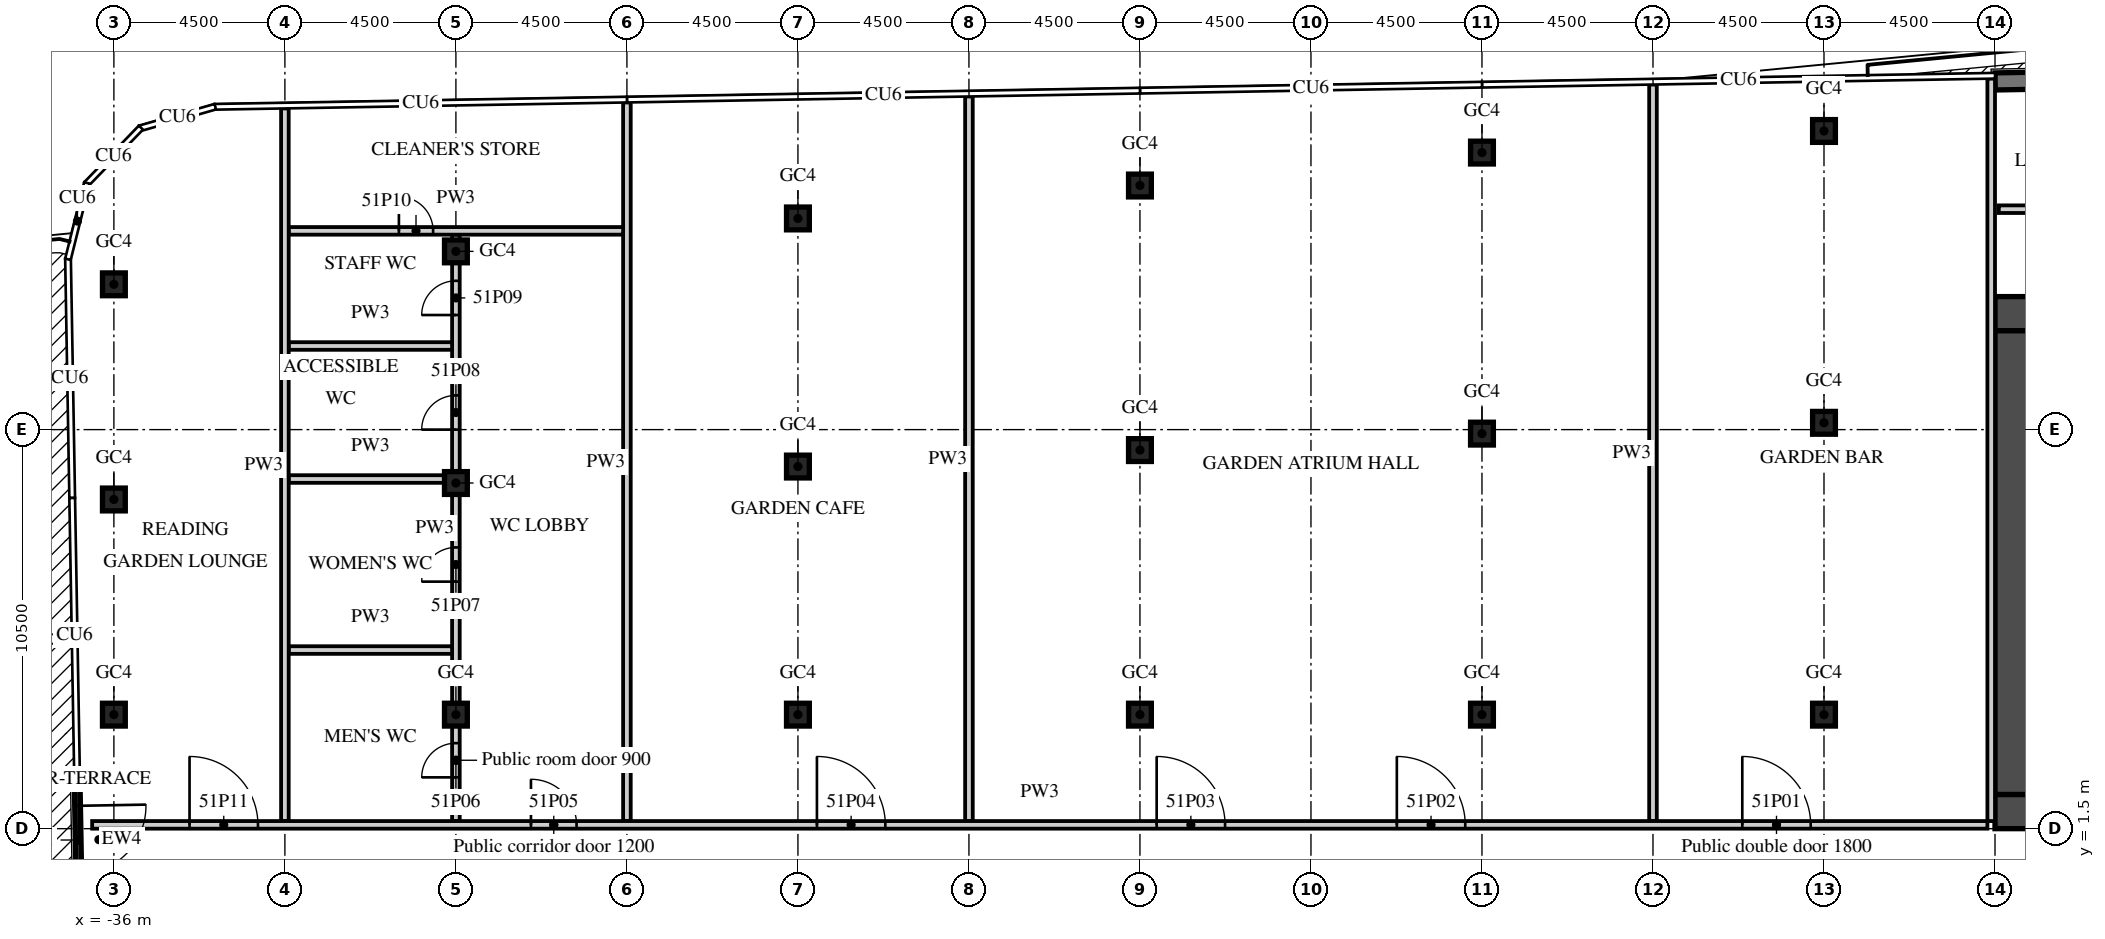
"""IFC4 building model, lengths in metres.
Left out: names, types, materials, properties, quantities, classifications, styles, units other than length and angle.
Written with IfcOpenShell. Run it as: python <this file> out.ifc"""

import sys

from ifc_helpers import new_model, si_unit, direction, frame, frame_2d, origin, origin_2d, place, context, subcontext, project, spatial, rectangle, extrude, element, fill, save


model = new_model("IFC4")
c1 = context("Model", 3, precision=1e-05, world=origin(), true_north=direction((0.0, 1.0)))
c2 = subcontext(c1, "Body", "Model", "MODEL_VIEW")
j1 = project(units=[si_unit("LENGTHUNIT", "METRE"), si_unit("PLANEANGLEUNIT", "RADIAN")], contexts=[c1])
p1 = place(None, origin())
s1 = spatial("IfcSite", under=j1, at=p1, CompositionType="ELEMENT")
p2 = place(p1, origin())
s2 = spatial("IfcBuilding", under=s1, at=p2, CompositionType="ELEMENT")
p3 = place(p2, frame((0.0, 0.0, 211.1)))
s3 = spatial("IfcBuildingStorey", under=s2, at=p3, CompositionType="ELEMENT", Elevation=211.1)
for number, where, z_axis, x_axis in (
    (1, (-36.0, 4.5, 0.0), (0.0, 0.0, 1.0), (1.0, 0.0, 0.0)),
    (2, (-36.0, 10.162, 0.0), (0.0, 0.0, 1.0), (1.0, 0.0, 0.0)),
    (3, (-36.0, 15.823, 0.0), (0.0, 0.0, 1.0), (1.0, 0.0, 0.0)),
    (4, (-27.0, 4.5, 0.0), (0.0, 0.0, 1.0), (1.0, 0.0, 0.0)),
    (5, (-27.0, 10.595, 0.0), (0.0, 0.0, 1.0), (1.0, 0.0, 0.0)),
    (6, (-27.0, 16.69, 0.0), (0.0, 0.0, 1.0), (1.0, 0.0, 0.0)),
    (7, (-18.0, 4.5, 0.0), (0.0, 0.0, 1.0), (1.0, 0.0, 0.0)),
    (8, (-18.0, 11.028, 0.0), (0.0, 0.0, 1.0), (1.0, 0.0, 0.0)),
    (9, (-18.0, 17.556, 0.0), (0.0, 0.0, 1.0), (1.0, 0.0, 0.0)),
    (10, (-9.0, 4.5, 0.0), (0.0, 0.0, 1.0), (1.0, 0.0, 0.0)),
    (11, (-9.0, 11.461, 0.0), (0.0, 0.0, 1.0), (1.0, 0.0, 0.0)),
    (12, (-9.0, 18.423, 0.0), (0.0, 0.0, 1.0), (1.0, 0.0, 0.0)),
    (13, (0.0, 4.5, 0.0), (0.0, 0.0, 1.0), (1.0, 0.0, 0.0)),
    (14, (0.0, 11.895, 0.0), (0.0, 0.0, 1.0), (1.0, 0.0, 0.0)),
    (15, (0.0, 19.29, 0.0), (0.0, 0.0, 1.0), (1.0, 0.0, 0.0)),
    (16, (9.0, 4.5, 0.0), (0.0, 0.0, 1.0), (1.0, 0.0, 0.0)),
    (17, (9.0, 12.179, 0.0), (0.0, 0.0, 1.0), (1.0, 0.0, 0.0)),
    (18, (9.0, 19.858, 0.0), (0.0, 0.0, 1.0), (1.0, 0.0, 0.0)),
):
    element("IfcColumn", number, at=place(p3, frame(where, z_axis=z_axis, x_axis=x_axis)), inside=s3, PredefinedType="COLUMN", context=c2, shape_type="SweptSolid", body=[
        extrude(rectangle(XDim=0.6, YDim=0.6, at=origin_2d()), origin(), (0.0, 0.0, 1.0), 5.32),
    ])
p4 = place(p3, frame((-36.971, 3.001, 0.0), z_axis=(0.0, 0.0, 1.0), x_axis=(0.017429353659, -0.999848097278, 0.0)))
e19 = element("IfcWall", 19, at=p4, inside=s3, PredefinedType="SOLIDWALL", context=c2, shape_type="SweptSolid", body=[
    extrude(rectangle(XDim=3.6, YDim=0.15, at=frame_2d((1.8, 0.0))), origin(), (0.0, 0.0, 1.0), 6.32),
])
p5 = place(p4, frame((0.9, 0.0, 0.0)))
e20 = element("IfcOpeningElement", 20, at=p5, cuts=e19, PredefinedType="OPENING", context=c2, shape_type="SweptSolid", body=[
    extrude(rectangle(XDim=1.8, YDim=2.4, at=frame_2d((0.9, 1.2))), frame((0.0, 0.085, 0.0), z_axis=(0.0, -1.0, 0.0), x_axis=(1.0, 0.0, 0.0)), (0.0, 0.0, 1.0), 0.17),
])
p6 = place(p3, frame((31.504, 21.476, 0.0), z_axis=(0.0, 0.0, 1.0), x_axis=(-0.999847677887, -0.017453395744, 0.0)))
e21 = element("IfcWall", 21, at=p6, inside=s3, PredefinedType="SOLIDWALL", context=c2, shape_type="SweptSolid", body=[
    extrude(rectangle(XDim=18.003, YDim=0.45, at=frame_2d((9.001, 0.0))), origin(), (0.0, 0.0, 1.0), 6.32),
])
p7 = place(p3, frame((13.5, 1.95, 0.0), z_axis=(0.0, 0.0, 1.0), x_axis=(1.0, 0.0, 0.0)))
e22 = element("IfcWall", 22, at=p7, inside=s3, PredefinedType="SHEAR", context=c2, shape_type="SweptSolid", body=[
    extrude(rectangle(XDim=18.0, YDim=0.9, at=frame_2d((9.0, 0.0))), origin(), (0.0, 0.0, 1.0), 6.32),
])
p8 = place(p7, frame((1.475, 0.0, 0.0)))
e23 = element("IfcOpeningElement", 23, at=p8, cuts=e22, PredefinedType="OPENING", context=c2, shape_type="SweptSolid", body=[
    extrude(rectangle(XDim=1.8, YDim=2.1, at=frame_2d((0.9, 1.05))), frame((0.0, 0.46, 0.0), z_axis=(0.0, -1.0, 0.0), x_axis=(1.0, 0.0, 0.0)), (0.0, 0.0, 1.0), 0.92),
])
p9 = place(p3, frame((13.5, 15.05, 0.0), z_axis=(0.0, 0.0, 1.0), x_axis=(1.0, 0.0, 0.0)))
e24 = element("IfcWall", 24, at=p9, inside=s3, PredefinedType="SHEAR", context=c2, shape_type="SweptSolid", body=[
    extrude(rectangle(XDim=6.8, YDim=0.9, at=frame_2d((3.4, 0.0))), origin(), (0.0, 0.0, 1.0), 6.32),
])
p10 = place(p9, frame((4.725, 0.0, 0.0)))
e25 = element("IfcOpeningElement", 25, at=p10, cuts=e24, PredefinedType="OPENING", context=c2, shape_type="SweptSolid", body=[
    extrude(rectangle(XDim=1.2, YDim=2.1, at=frame_2d((0.6, 1.05))), frame((0.0, 0.46, 0.0), z_axis=(0.0, -1.0, 0.0), x_axis=(1.0, 0.0, 0.0)), (0.0, 0.0, 1.0), 0.92),
])
p11 = place(p3, frame((13.95, 2.4, 0.0), z_axis=(0.0, 0.0, 1.0), x_axis=(0.0, 1.0, 0.0)))
e26 = element("IfcWall", 26, at=p11, inside=s3, PredefinedType="SHEAR", context=c2, shape_type="SweptSolid", body=[
    extrude(rectangle(XDim=12.2, YDim=0.9, at=frame_2d((6.1, 0.0))), origin(), (0.0, 0.0, 1.0), 6.32),
])
p12 = place(p3, frame((13.6, 17.8, 0.0), z_axis=(0.0, 0.0, 1.0), x_axis=(1.0, 0.0, 0.0)))
e27 = element("IfcWall", 27, at=p12, inside=s3, PredefinedType="PARTITIONING", context=c2, shape_type="SweptSolid", body=[
    extrude(rectangle(XDim=28.958, YDim=0.2, at=frame_2d((14.479, 0.0))), origin(), (0.0, 0.0, 1.0), 6.32),
])
p13 = place(p12, frame((16.613, 0.0, 0.0)))
e28 = element("IfcOpeningElement", 28, at=p13, cuts=e27, PredefinedType="OPENING", context=c2, shape_type="SweptSolid", body=[
    extrude(rectangle(XDim=0.9, YDim=2.1, at=frame_2d((0.45, 1.05))), frame((0.0, 0.11, 0.0), z_axis=(0.0, -1.0, 0.0), x_axis=(1.0, 0.0, 0.0)), (0.0, 0.0, 1.0), 0.22),
])
p14 = place(p12, frame((8.312, 0.0, 0.0)))
e29 = element("IfcOpeningElement", 29, at=p14, cuts=e27, PredefinedType="OPENING", context=c2, shape_type="SweptSolid", body=[
    extrude(rectangle(XDim=0.9, YDim=2.1, at=frame_2d((0.45, 1.05))), frame((0.0, 0.11, 0.0), z_axis=(0.0, -1.0, 0.0), x_axis=(1.0, 0.0, 0.0)), (0.0, 0.0, 1.0), 0.22),
])
p15 = place(p3, frame((4.5, 1.7, 0.0), z_axis=(0.0, 0.0, 1.0), x_axis=(0.0, 1.0, 0.0)))
e30 = element("IfcWall", 30, at=p15, inside=s3, PredefinedType="PARTITIONING", context=c2, shape_type="SweptSolid", body=[
    extrude(rectangle(XDim=19.379, YDim=0.2, at=frame_2d((9.69, 0.0))), origin(), (0.0, 0.0, 1.0), 6.32),
])
p16 = place(p3, frame((-13.5, 1.7, 0.0), z_axis=(0.0, 0.0, 1.0), x_axis=(0.0, 1.0, 0.0)))
e31 = element("IfcWall", 31, at=p16, inside=s3, PredefinedType="PARTITIONING", context=c2, shape_type="SweptSolid", body=[
    extrude(rectangle(XDim=19.065, YDim=0.2, at=frame_2d((9.533, 0.0))), origin(), (0.0, 0.0, 1.0), 6.32),
])
p17 = place(p3, frame((-22.5, 1.7, 0.0), z_axis=(0.0, 0.0, 1.0), x_axis=(0.0, 1.0, 0.0)))
e32 = element("IfcWall", 32, at=p17, inside=s3, PredefinedType="PARTITIONING", context=c2, shape_type="SweptSolid", body=[
    extrude(rectangle(XDim=18.908, YDim=0.2, at=frame_2d((9.454, 0.0))), origin(), (0.0, 0.0, 1.0), 6.32),
])
p18 = place(p3, frame((-27.0, 1.7, 0.0), z_axis=(0.0, 0.0, 1.0), x_axis=(0.0, 1.0, 0.0)))
e33 = element("IfcWall", 33, at=p18, inside=s3, PredefinedType="PARTITIONING", context=c2, shape_type="SweptSolid", body=[
    extrude(rectangle(XDim=15.429, YDim=0.2, at=frame_2d((7.715, 0.0))), origin(), (0.0, 0.0, 1.0), 5.32),
])
p19 = place(p18, frame((1.15, 0.0, 0.0)))
e34 = element("IfcOpeningElement", 34, at=p19, cuts=e33, PredefinedType="OPENING", context=c2, shape_type="SweptSolid", body=[
    extrude(rectangle(XDim=0.9, YDim=2.1, at=frame_2d((0.45, 1.05))), frame((0.0, 0.11, 0.0), z_axis=(0.0, -1.0, 0.0), x_axis=(1.0, 0.0, 0.0)), (0.0, 0.0, 1.0), 0.22),
])
p20 = place(p18, frame((6.3, 0.0, 0.0)))
e35 = element("IfcOpeningElement", 35, at=p20, cuts=e33, PredefinedType="OPENING", context=c2, shape_type="SweptSolid", body=[
    extrude(rectangle(XDim=0.9, YDim=2.1, at=frame_2d((0.45, 1.05))), frame((0.0, 0.11, 0.0), z_axis=(0.0, -1.0, 0.0), x_axis=(1.0, 0.0, 0.0)), (0.0, 0.0, 1.0), 0.22),
])
p21 = place(p18, frame((10.3, 0.0, 0.0)))
e36 = element("IfcOpeningElement", 36, at=p21, cuts=e33, PredefinedType="OPENING", context=c2, shape_type="SweptSolid", body=[
    extrude(rectangle(XDim=0.9, YDim=2.1, at=frame_2d((0.45, 1.05))), frame((0.0, 0.11, 0.0), z_axis=(0.0, -1.0, 0.0), x_axis=(1.0, 0.0, 0.0)), (0.0, 0.0, 1.0), 0.22),
])
p22 = place(p18, frame((13.315, 0.0, 0.0)))
e37 = element("IfcOpeningElement", 37, at=p22, cuts=e33, PredefinedType="OPENING", context=c2, shape_type="SweptSolid", body=[
    extrude(rectangle(XDim=0.9, YDim=2.1, at=frame_2d((0.45, 1.05))), frame((0.0, 0.11, 0.0), z_axis=(0.0, -1.0, 0.0), x_axis=(1.0, 0.0, 0.0)), (0.0, 0.0, 1.0), 0.22),
])
for number, where, z_axis, x_axis in (
    (38, (-31.4, 6.2, 0.0), (0.0, 0.0, 1.0), (1.0, 0.0, 0.0)),
    (39, (-31.4, 10.7, 0.0), (0.0, 0.0, 1.0), (1.0, 0.0, 0.0)),
    (40, (-31.4, 14.2, 0.0), (0.0, 0.0, 1.0), (1.0, 0.0, 0.0)),
):
    element("IfcWall", number, at=place(p3, frame(where, z_axis=z_axis, x_axis=x_axis)), inside=s3, PredefinedType="PARTITIONING", context=c2, shape_type="SweptSolid", body=[
        extrude(rectangle(XDim=4.3, YDim=0.2, at=frame_2d((2.15, 0.0))), origin(), (0.0, 0.0, 1.0), 5.32),
    ])
p23 = place(p3, frame((-31.4, 17.229, 0.0), z_axis=(0.0, 0.0, 1.0), x_axis=(1.0, 0.0, 0.0)))
e41 = element("IfcWall", 41, at=p23, inside=s3, PredefinedType="PARTITIONING", context=c2, shape_type="SweptSolid", body=[
    extrude(rectangle(XDim=8.8, YDim=0.2, at=frame_2d((4.4, 0.0))), origin(), (0.0, 0.0, 1.0), 5.32),
])
p24 = place(p23, frame((2.9, 0.0, 0.0)))
e42 = element("IfcOpeningElement", 42, at=p24, cuts=e41, PredefinedType="OPENING", context=c2, shape_type="SweptSolid", body=[
    extrude(rectangle(XDim=0.9, YDim=2.1, at=frame_2d((0.45, 1.05))), frame((0.0, 0.11, 0.0), z_axis=(0.0, -1.0, 0.0), x_axis=(1.0, 0.0, 0.0)), (0.0, 0.0, 1.0), 0.22),
])
p25 = place(p3, frame((-31.5, 1.7, 0.0), z_axis=(0.0, 0.0, 1.0), x_axis=(0.0, 1.0, 0.0)))
e43 = element("IfcWall", 43, at=p25, inside=s3, PredefinedType="PARTITIONING", context=c2, shape_type="SweptSolid", body=[
    extrude(rectangle(XDim=18.751, YDim=0.2, at=frame_2d((9.375, 0.0))), origin(), (0.0, 0.0, 1.0), 6.32),
])
p26 = place(p3, frame((-36.572, 1.6, 0.0), z_axis=(0.0, 0.0, 1.0), x_axis=(1.0, 0.0, 0.0)))
e44 = element("IfcWall", 44, at=p26, inside=s3, PredefinedType="PARTITIONING", context=c2, shape_type="SweptSolid", body=[
    extrude(rectangle(XDim=49.872, YDim=0.2, at=frame_2d((24.936, 0.0))), origin(), (0.0, 0.0, 1.0), 5.32),
])
p27 = place(p26, frame((43.422, 0.0, 0.0)))
e45 = element("IfcOpeningElement", 45, at=p27, cuts=e44, PredefinedType="OPENING", context=c2, shape_type="SweptSolid", body=[
    extrude(rectangle(XDim=1.8, YDim=2.1, at=frame_2d((0.9, 1.05))), frame((0.0, 0.11, 0.0), z_axis=(0.0, -1.0, 0.0), x_axis=(1.0, 0.0, 0.0)), (0.0, 0.0, 1.0), 0.22),
])
p28 = place(p26, frame((34.332, 0.0, 0.0)))
e46 = element("IfcOpeningElement", 46, at=p28, cuts=e44, PredefinedType="OPENING", context=c2, shape_type="SweptSolid", body=[
    extrude(rectangle(XDim=1.8, YDim=2.1, at=frame_2d((0.9, 1.05))), frame((0.0, 0.11, 0.0), z_axis=(0.0, -1.0, 0.0), x_axis=(1.0, 0.0, 0.0)), (0.0, 0.0, 1.0), 0.22),
])
p29 = place(p26, frame((28.012, 0.0, 0.0)))
e47 = element("IfcOpeningElement", 47, at=p29, cuts=e44, PredefinedType="OPENING", context=c2, shape_type="SweptSolid", body=[
    extrude(rectangle(XDim=1.8, YDim=2.1, at=frame_2d((0.9, 1.05))), frame((0.0, 0.11, 0.0), z_axis=(0.0, -1.0, 0.0), x_axis=(1.0, 0.0, 0.0)), (0.0, 0.0, 1.0), 0.22),
])
p30 = place(p26, frame((19.072, 0.0, 0.0)))
e48 = element("IfcOpeningElement", 48, at=p30, cuts=e44, PredefinedType="OPENING", context=c2, shape_type="SweptSolid", body=[
    extrude(rectangle(XDim=1.8, YDim=2.1, at=frame_2d((0.9, 1.05))), frame((0.0, 0.11, 0.0), z_axis=(0.0, -1.0, 0.0), x_axis=(1.0, 0.0, 0.0)), (0.0, 0.0, 1.0), 0.22),
])
p31 = place(p26, frame((11.547, 0.0, 0.0)))
e49 = element("IfcOpeningElement", 49, at=p31, cuts=e44, PredefinedType="OPENING", context=c2, shape_type="SweptSolid", body=[
    extrude(rectangle(XDim=1.2, YDim=2.1, at=frame_2d((0.6, 1.05))), frame((0.0, 0.11, 0.0), z_axis=(0.0, -1.0, 0.0), x_axis=(1.0, 0.0, 0.0)), (0.0, 0.0, 1.0), 0.22),
])
p32 = place(p26, frame((2.563, 0.0, 0.0)))
e50 = element("IfcOpeningElement", 50, at=p32, cuts=e44, PredefinedType="OPENING", context=c2, shape_type="SweptSolid", body=[
    extrude(rectangle(XDim=1.8, YDim=2.1, at=frame_2d((0.9, 1.05))), frame((0.0, 0.11, 0.0), z_axis=(0.0, -1.0, 0.0), x_axis=(1.0, 0.0, 0.0)), (0.0, 0.0, 1.0), 0.22),
])
p33 = place(p3, frame((13.4, 1.7, 0.0), z_axis=(0.0, 0.0, 1.0), x_axis=(0.0, 1.0, 0.0)))
e51 = element("IfcWall", 51, at=p33, inside=s3, PredefinedType="PARTITIONING", context=c2, shape_type="SweptSolid", body=[
    extrude(rectangle(XDim=19.535, YDim=0.2, at=frame_2d((9.767, 0.0))), origin(), (0.0, 0.0, 1.0), 6.32),
])
p34 = place(p5, origin())
e52 = element("IfcDoor", 52, at=p34, inside=s3, OperationType="SINGLE_SWING_LEFT", PredefinedType="DOOR", context=c2, shape_type="SweptSolid", body=[
    extrude(rectangle(XDim=1.8, YDim=2.4, at=frame_2d((0.9, 1.2))), frame((0.0, 0.025, 0.0), z_axis=(0.0, -1.0, 0.0), x_axis=(1.0, 0.0, 0.0)), (0.0, 0.0, 1.0), 0.05),
])
fill(e20, e52)
p35 = place(p27, origin())
e53 = element("IfcDoor", 53, at=p35, inside=s3, OperationType="DOUBLE_DOOR_DOUBLE_SWING", PredefinedType="DOOR", context=c2, shape_type="SweptSolid", body=[
    extrude(rectangle(XDim=1.8, YDim=2.1, at=frame_2d((0.9, 1.05))), frame((0.0, 0.025, 0.0), z_axis=(0.0, -1.0, 0.0), x_axis=(1.0, 0.0, 0.0)), (0.0, 0.0, 1.0), 0.05),
])
fill(e45, e53)
p36 = place(p28, origin())
e54 = element("IfcDoor", 54, at=p36, inside=s3, OperationType="DOUBLE_DOOR_DOUBLE_SWING", PredefinedType="DOOR", context=c2, shape_type="SweptSolid", body=[
    extrude(rectangle(XDim=1.8, YDim=2.1, at=frame_2d((0.9, 1.05))), frame((0.0, 0.025, 0.0), z_axis=(0.0, -1.0, 0.0), x_axis=(1.0, 0.0, 0.0)), (0.0, 0.0, 1.0), 0.05),
])
fill(e46, e54)
p37 = place(p29, origin())
e55 = element("IfcDoor", 55, at=p37, inside=s3, OperationType="DOUBLE_DOOR_DOUBLE_SWING", PredefinedType="DOOR", context=c2, shape_type="SweptSolid", body=[
    extrude(rectangle(XDim=1.8, YDim=2.1, at=frame_2d((0.9, 1.05))), frame((0.0, 0.025, 0.0), z_axis=(0.0, -1.0, 0.0), x_axis=(1.0, 0.0, 0.0)), (0.0, 0.0, 1.0), 0.05),
])
fill(e47, e55)
p38 = place(p30, origin())
e56 = element("IfcDoor", 56, at=p38, inside=s3, OperationType="DOUBLE_DOOR_DOUBLE_SWING", PredefinedType="DOOR", context=c2, shape_type="SweptSolid", body=[
    extrude(rectangle(XDim=1.8, YDim=2.1, at=frame_2d((0.9, 1.05))), frame((0.0, 0.025, 0.0), z_axis=(0.0, -1.0, 0.0), x_axis=(1.0, 0.0, 0.0)), (0.0, 0.0, 1.0), 0.05),
])
fill(e48, e56)
p39 = place(p31, origin())
e57 = element("IfcDoor", 57, at=p39, inside=s3, OperationType="SINGLE_SWING_LEFT", PredefinedType="DOOR", context=c2, shape_type="SweptSolid", body=[
    extrude(rectangle(XDim=1.2, YDim=2.1, at=frame_2d((0.6, 1.05))), frame((0.0, 0.025, 0.0), z_axis=(0.0, -1.0, 0.0), x_axis=(1.0, 0.0, 0.0)), (0.0, 0.0, 1.0), 0.05),
])
fill(e49, e57)
p40 = place(p19, origin())
e58 = element("IfcDoor", 58, at=p40, inside=s3, OperationType="SINGLE_SWING_LEFT", PredefinedType="DOOR", context=c2, shape_type="SweptSolid", body=[
    extrude(rectangle(XDim=0.9, YDim=2.1, at=frame_2d((0.45, 1.05))), frame((0.0, 0.025, 0.0), z_axis=(0.0, -1.0, 0.0), x_axis=(1.0, 0.0, 0.0)), (0.0, 0.0, 1.0), 0.05),
])
fill(e34, e58)
p41 = place(p20, origin())
e59 = element("IfcDoor", 59, at=p41, inside=s3, OperationType="SINGLE_SWING_LEFT", PredefinedType="DOOR", context=c2, shape_type="SweptSolid", body=[
    extrude(rectangle(XDim=0.9, YDim=2.1, at=frame_2d((0.45, 1.05))), frame((0.0, 0.025, 0.0), z_axis=(0.0, -1.0, 0.0), x_axis=(1.0, 0.0, 0.0)), (0.0, 0.0, 1.0), 0.05),
])
fill(e35, e59)
p42 = place(p21, origin())
e60 = element("IfcDoor", 60, at=p42, inside=s3, OperationType="SINGLE_SWING_LEFT", PredefinedType="DOOR", context=c2, shape_type="SweptSolid", body=[
    extrude(rectangle(XDim=0.9, YDim=2.1, at=frame_2d((0.45, 1.05))), frame((0.0, 0.025, 0.0), z_axis=(0.0, -1.0, 0.0), x_axis=(1.0, 0.0, 0.0)), (0.0, 0.0, 1.0), 0.05),
])
fill(e36, e60)
p43 = place(p22, origin())
e61 = element("IfcDoor", 61, at=p43, inside=s3, OperationType="SINGLE_SWING_LEFT", PredefinedType="DOOR", context=c2, shape_type="SweptSolid", body=[
    extrude(rectangle(XDim=0.9, YDim=2.1, at=frame_2d((0.45, 1.05))), frame((0.0, 0.025, 0.0), z_axis=(0.0, -1.0, 0.0), x_axis=(1.0, 0.0, 0.0)), (0.0, 0.0, 1.0), 0.05),
])
fill(e37, e61)
p44 = place(p24, origin())
e62 = element("IfcDoor", 62, at=p44, inside=s3, OperationType="SINGLE_SWING_LEFT", PredefinedType="DOOR", context=c2, shape_type="SweptSolid", body=[
    extrude(rectangle(XDim=0.9, YDim=2.1, at=frame_2d((0.45, 1.05))), frame((0.0, 0.025, 0.0), z_axis=(0.0, -1.0, 0.0), x_axis=(1.0, 0.0, 0.0)), (0.0, 0.0, 1.0), 0.05),
])
fill(e42, e62)
p45 = place(p32, origin())
e63 = element("IfcDoor", 63, at=p45, inside=s3, OperationType="DOUBLE_DOOR_DOUBLE_SWING", PredefinedType="DOOR", context=c2, shape_type="SweptSolid", body=[
    extrude(rectangle(XDim=1.8, YDim=2.1, at=frame_2d((0.9, 1.05))), frame((0.0, 0.025, 0.0), z_axis=(0.0, -1.0, 0.0), x_axis=(1.0, 0.0, 0.0)), (0.0, 0.0, 1.0), 0.05),
])
fill(e50, e63)
save(model, sys.argv[1])
